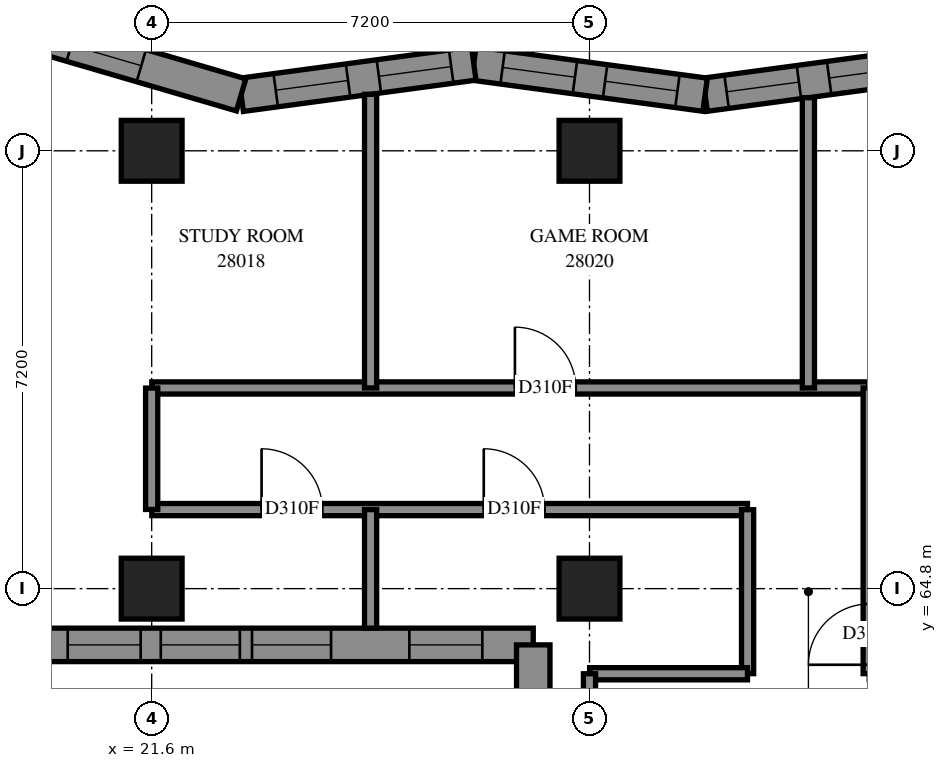
"""IFC4 building model, lengths in metres.
Left out: names, types, materials, properties, quantities, classifications, styles, units other than length and angle.
Written with IfcOpenShell. Run it as: python <this file> out.ifc"""

import sys

from ifc_helpers import new_model, si_unit, direction, frame, frame_2d, origin, origin_2d, place, context, subcontext, project, spatial, polyline, rectangle, outline, extrude, element, fill, save


model = new_model("IFC4")
c1 = context("Model", 3, precision=1e-05, world=origin(), true_north=direction((0.0, 1.0)))
c2 = subcontext(c1, "Body", "Model", "MODEL_VIEW")
j1 = project(units=[si_unit("LENGTHUNIT", "METRE"), si_unit("PLANEANGLEUNIT", "RADIAN")], contexts=[c1])
p1 = place(None, origin())
s1 = spatial("IfcSite", under=j1, at=p1, CompositionType="ELEMENT")
p2 = place(p1, origin())
s2 = spatial("IfcBuilding", under=s1, at=p2, CompositionType="ELEMENT")
p3 = place(p2, frame((0.0, 0.0, 105.0)))
s3 = spatial("IfcBuildingStorey", under=s2, at=p3, CompositionType="ELEMENT", Elevation=105.0)
for number, where, z_axis, x_axis in (
    (1, (21.6, 64.8, 0.0), (0.0, 0.0, 1.0), (1.0, 0.0, 0.0)),
    (2, (21.6, 72.0, 0.0), (0.0, 0.0, 1.0), (1.0, 0.0, 0.0)),
    (3, (28.8, 64.8, 0.0), (0.0, 0.0, 1.0), (1.0, 0.0, 0.0)),
    (4, (28.8, 72.0, 0.0), (0.0, 0.0, 1.0), (1.0, 0.0, 0.0)),
):
    element("IfcColumn", number, at=place(p3, frame(where, z_axis=z_axis, x_axis=x_axis)), inside=s3, PredefinedType="COLUMN", context=c2, shape_type="SweptSolid", body=[
        extrude(rectangle(XDim=1.0, YDim=1.0, at=origin_2d()), origin(), (0.0, 0.0, 1.0), 3.1),
    ])
p4 = place(p3, frame((34.505, 73.434, 0.0), z_axis=(0.0, 0.0, 1.0), x_axis=(-0.9910647018, -0.133381996, 0.0)))
e5 = element("IfcWall", 5, at=p4, inside=s3, PredefinedType="SOLIDWALL", context=c2, shape_type="SweptSolid", body=[
    extrude(outline(polyline([(-0.037, -0.275), (3.802, -0.275), (3.876, 0.275), (0.037, 0.275), (-0.037, -0.275)])), origin(), (0.0, 0.0, 1.0), 3.1),
])
p5 = place(p4, frame((0.581, 0.0, 0.5)))
e6 = element("IfcOpeningElement", 6, at=p5, cuts=e5, PredefinedType="OPENING", context=c2, shape_type="SweptSolid", body=[
    extrude(rectangle(XDim=1.2, YDim=2.45, at=frame_2d((0.6, 1.225))), frame((0.0, 0.285, 0.0), z_axis=(0.0, -1.0, 0.0), x_axis=(1.0, 0.0, 0.0)), (0.0, 0.0, 1.0), 0.57),
])
p6 = place(p4, frame((2.281, 0.0, 0.5)))
e7 = element("IfcOpeningElement", 7, at=p6, cuts=e5, PredefinedType="OPENING", context=c2, shape_type="SweptSolid", body=[
    extrude(rectangle(XDim=1.2, YDim=2.45, at=frame_2d((0.6, 1.225))), frame((0.0, 0.285, 0.0), z_axis=(0.0, -1.0, 0.0), x_axis=(1.0, 0.0, 0.0)), (0.0, 0.0, 1.0), 0.57),
])
p7 = place(p3, frame((30.701, 72.922, 0.0), z_axis=(0.0, 0.0, 1.0), x_axis=(-0.9910651652, 0.1333785524, 0.0)))
e8 = element("IfcWall", 8, at=p7, inside=s3, PredefinedType="SOLIDWALL", context=c2, shape_type="SweptSolid", body=[
    extrude(outline(polyline([(0.037, -0.275), (3.876, -0.275), (3.802, 0.275), (-0.037, 0.275), (0.037, -0.275)])), origin(), (0.0, 0.0, 1.0), 3.1),
])
p8 = place(p7, frame((0.459, 0.0, 0.5)))
e9 = element("IfcOpeningElement", 9, at=p8, cuts=e8, PredefinedType="OPENING", context=c2, shape_type="SweptSolid", body=[
    extrude(rectangle(XDim=1.2, YDim=2.45, at=frame_2d((0.6, 1.225))), frame((0.0, 0.285, 0.0), z_axis=(0.0, -1.0, 0.0), x_axis=(1.0, 0.0, 0.0)), (0.0, 0.0, 1.0), 0.57),
])
p9 = place(p7, frame((2.16, 0.0, 0.5)))
e10 = element("IfcOpeningElement", 10, at=p9, cuts=e8, PredefinedType="OPENING", context=c2, shape_type="SweptSolid", body=[
    extrude(rectangle(XDim=1.2, YDim=2.45, at=frame_2d((0.6, 1.225))), frame((0.0, 0.285, 0.0), z_axis=(0.0, -1.0, 0.0), x_axis=(1.0, 0.0, 0.0)), (0.0, 0.0, 1.0), 0.57),
])
p10 = place(p3, frame((26.897, 73.434, 0.0), z_axis=(0.0, 0.0, 1.0), x_axis=(-0.9910665233, -0.1333684607, 0.0)))
e11 = element("IfcWall", 11, at=p10, inside=s3, PredefinedType="SOLIDWALL", context=c2, shape_type="SweptSolid", body=[
    extrude(outline(polyline([(-0.037, -0.275), (3.802, -0.275), (3.918, 0.275), (0.037, 0.275), (-0.037, -0.275)])), origin(), (0.0, 0.0, 1.0), 3.1),
])
p11 = place(p10, frame((0.374, 0.0, 0.5)))
e12 = element("IfcOpeningElement", 12, at=p11, cuts=e11, PredefinedType="OPENING", context=c2, shape_type="SweptSolid", body=[
    extrude(rectangle(XDim=1.2, YDim=2.45, at=frame_2d((0.6, 1.225))), frame((0.0, 0.285, 0.0), z_axis=(0.0, -1.0, 0.0), x_axis=(1.0, 0.0, 0.0)), (0.0, 0.0, 1.0), 0.57),
])
p12 = place(p10, frame((2.086, 0.0, 0.5)))
e13 = element("IfcOpeningElement", 13, at=p12, cuts=e11, PredefinedType="OPENING", context=c2, shape_type="SweptSolid", body=[
    extrude(rectangle(XDim=1.2, YDim=2.45, at=frame_2d((0.6, 1.225))), frame((0.0, 0.285, 0.0), z_axis=(0.0, -1.0, 0.0), x_axis=(1.0, 0.0, 0.0)), (0.0, 0.0, 1.0), 0.57),
])
p13 = place(p3, frame((23.071, 72.92, 0.0), z_axis=(0.0, 0.0, 1.0), x_axis=(-0.9598398865, 0.280548378, 0.0)))
e14 = element("IfcWall", 14, at=p13, inside=s3, PredefinedType="SOLIDWALL", context=c2, shape_type="SweptSolid", body=[
    extrude(outline(polyline([(0.058, -0.275), (4.022, -0.275), (3.288, 0.275), (-0.058, 0.275), (0.058, -0.275)])), origin(), (0.0, 0.0, 1.0), 3.1),
])
p14 = place(p13, frame((1.71, 0.0, 0.5)))
e15 = element("IfcOpeningElement", 15, at=p14, cuts=e14, PredefinedType="OPENING", context=c2, shape_type="SweptSolid", body=[
    extrude(rectangle(XDim=1.2, YDim=2.45, at=frame_2d((0.6, 1.225))), frame((0.0, 0.285, 0.0), z_axis=(0.0, -1.0, 0.0), x_axis=(1.0, 0.0, 0.0)), (0.0, 0.0, 1.0), 0.57),
])
p15 = place(p3, frame((19.563, 63.875, 0.0), z_axis=(0.0, 0.0, 1.0), x_axis=(1.0, 0.0, 0.0)))
e16 = element("IfcWall", 16, at=p15, inside=s3, PredefinedType="SOLIDWALL", context=c2, shape_type="SweptSolid", body=[
    extrude(outline(polyline([(-0.275, -0.275), (8.037, -0.275), (8.587, 0.275), (0.275, 0.275), (-0.275, -0.275)])), origin(), (0.0, 0.0, 1.0), 3.1),
])
p16 = place(p15, frame((2.187, 0.0, 0.5)))
e17 = element("IfcOpeningElement", 17, at=p16, cuts=e16, PredefinedType="OPENING", context=c2, shape_type="SweptSolid", body=[
    extrude(rectangle(XDim=1.3, YDim=2.45, at=frame_2d((0.65, 1.225))), frame((0.0, 0.285, 0.0), z_axis=(0.0, -1.0, 0.0), x_axis=(1.0, 0.0, 0.0)), (0.0, 0.0, 1.0), 0.57),
])
p17 = place(p15, frame((3.687, 0.0, 0.5)))
e18 = element("IfcOpeningElement", 18, at=p17, cuts=e16, PredefinedType="OPENING", context=c2, shape_type="SweptSolid", body=[
    extrude(rectangle(XDim=1.3, YDim=2.45, at=frame_2d((0.65, 1.225))), frame((0.0, 0.285, 0.0), z_axis=(0.0, -1.0, 0.0), x_axis=(1.0, 0.0, 0.0)), (0.0, 0.0, 1.0), 0.57),
])
p18 = place(p15, frame((0.656, 0.0, 0.5)))
e19 = element("IfcOpeningElement", 19, at=p18, cuts=e16, PredefinedType="OPENING", context=c2, shape_type="SweptSolid", body=[
    extrude(rectangle(XDim=1.2, YDim=2.45, at=frame_2d((0.6, 1.225))), frame((0.0, 0.285, 0.0), z_axis=(0.0, -1.0, 0.0), x_axis=(1.0, 0.0, 0.0)), (0.0, 0.0, 1.0), 0.57),
])
p19 = place(p15, frame((6.274, 0.0, 0.5)))
e20 = element("IfcOpeningElement", 20, at=p19, cuts=e16, PredefinedType="OPENING", context=c2, shape_type="SweptSolid", body=[
    extrude(rectangle(XDim=1.2, YDim=2.45, at=frame_2d((0.6, 1.225))), frame((0.0, 0.285, 0.0), z_axis=(0.0, -1.0, 0.0), x_axis=(1.0, 0.0, 0.0)), (0.0, 0.0, 1.0), 0.57),
])
p20 = place(p3, frame((27.875, 63.875, 0.0), z_axis=(0.0, 0.0, 1.0), x_axis=(0.0, -1.0, 0.0)))
e21 = element("IfcWall", 21, at=p20, inside=s3, PredefinedType="SOLIDWALL", context=c2, shape_type="SweptSolid", body=[
    extrude(outline(polyline([(0.275, -0.275), (8.587, -0.275), (8.037, 0.275), (-0.275, 0.275), (0.275, -0.275)])), origin(), (0.0, 0.0, 1.0), 3.1),
])
p21 = place(p20, frame((3.325, 0.0, 0.5)))
e22 = element("IfcOpeningElement", 22, at=p21, cuts=e21, PredefinedType="OPENING", context=c2, shape_type="SweptSolid", body=[
    extrude(rectangle(XDim=1.3, YDim=2.45, at=frame_2d((0.65, 1.225))), frame((0.0, 0.285, 0.0), z_axis=(0.0, -1.0, 0.0), x_axis=(1.0, 0.0, 0.0)), (0.0, 0.0, 1.0), 0.57),
])
p22 = place(p20, frame((4.975, 0.0, 0.5)))
e23 = element("IfcOpeningElement", 23, at=p22, cuts=e21, PredefinedType="OPENING", context=c2, shape_type="SweptSolid", body=[
    extrude(rectangle(XDim=1.3, YDim=2.45, at=frame_2d((0.65, 1.225))), frame((0.0, 0.285, 0.0), z_axis=(0.0, -1.0, 0.0), x_axis=(1.0, 0.0, 0.0)), (0.0, 0.0, 1.0), 0.57),
])
p23 = place(p20, frame((0.838, 0.0, 0.5)))
e24 = element("IfcOpeningElement", 24, at=p23, cuts=e21, PredefinedType="OPENING", context=c2, shape_type="SweptSolid", body=[
    extrude(rectangle(XDim=1.2, YDim=2.45, at=frame_2d((0.6, 1.225))), frame((0.0, 0.285, 0.0), z_axis=(0.0, -1.0, 0.0), x_axis=(1.0, 0.0, 0.0)), (0.0, 0.0, 1.0), 0.57),
])
p24 = place(p20, frame((6.456, 0.0, 0.5)))
e25 = element("IfcOpeningElement", 25, at=p24, cuts=e21, PredefinedType="OPENING", context=c2, shape_type="SweptSolid", body=[
    extrude(rectangle(XDim=1.2, YDim=2.45, at=frame_2d((0.6, 1.225))), frame((0.0, 0.285, 0.0), z_axis=(0.0, -1.0, 0.0), x_axis=(1.0, 0.0, 0.0)), (0.0, 0.0, 1.0), 0.57),
])
p25 = place(p3, frame((21.602, 68.1, 0.0), z_axis=(0.0, 0.0, 1.0), x_axis=(1.0, 0.0, 0.0)))
e26 = element("IfcWall", 26, at=p25, inside=s3, PredefinedType="PARTITIONING", context=c2, shape_type="SweptSolid", body=[
    extrude(rectangle(XDim=11.798, YDim=0.2, at=frame_2d((5.899, 0.0))), origin(), (0.0, 0.0, 1.0), 3.1),
])
p26 = place(p25, frame((5.972, 0.0, 0.0)))
e27 = element("IfcOpeningElement", 27, at=p26, cuts=e26, PredefinedType="OPENING", context=c2, shape_type="SweptSolid", body=[
    extrude(rectangle(XDim=1.0, YDim=2.1, at=frame_2d((0.5, 1.05))), frame((0.0, 0.11, 0.0), z_axis=(0.0, -1.0, 0.0), x_axis=(1.0, 0.0, 0.0)), (0.0, 0.0, 1.0), 0.22),
])
p27 = place(p3, frame((21.602, 66.1, 0.0), z_axis=(0.0, 0.0, 1.0), x_axis=(1.0, 0.0, 0.0)))
e28 = element("IfcWall", 28, at=p27, inside=s3, PredefinedType="PARTITIONING", context=c2, shape_type="SweptSolid", body=[
    extrude(rectangle(XDim=9.796, YDim=0.2, at=frame_2d((4.898, 0.0))), origin(), (0.0, 0.0, 1.0), 3.1),
])
p28 = place(p27, frame((1.805, 0.0, 0.0)))
e29 = element("IfcOpeningElement", 29, at=p28, cuts=e28, PredefinedType="OPENING", context=c2, shape_type="SweptSolid", body=[
    extrude(rectangle(XDim=1.0, YDim=2.1, at=frame_2d((0.5, 1.05))), frame((0.0, 0.11, 0.0), z_axis=(0.0, -1.0, 0.0), x_axis=(1.0, 0.0, 0.0)), (0.0, 0.0, 1.0), 0.22),
])
p29 = place(p27, frame((5.459, 0.0, 0.0)))
e30 = element("IfcOpeningElement", 30, at=p29, cuts=e28, PredefinedType="OPENING", context=c2, shape_type="SweptSolid", body=[
    extrude(rectangle(XDim=1.0, YDim=2.1, at=frame_2d((0.5, 1.05))), frame((0.0, 0.11, 0.0), z_axis=(0.0, -1.0, 0.0), x_axis=(1.0, 0.0, 0.0)), (0.0, 0.0, 1.0), 0.22),
])
p30 = place(p3, frame((25.2, 68.1, 0.0), z_axis=(0.0, 0.0, 1.0), x_axis=(0.0, 1.0, 0.0)))
e31 = element("IfcWall", 31, at=p30, inside=s3, PredefinedType="PARTITIONING", context=c2, shape_type="SweptSolid", body=[
    extrude(rectangle(XDim=4.829, YDim=0.2, at=frame_2d((2.414, 0.0))), origin(), (0.0, 0.0, 1.0), 3.1),
])
p31 = place(p3, frame((32.4, 68.1, 0.0), z_axis=(0.0, 0.0, 1.0), x_axis=(0.0, 1.0, 0.0)))
e32 = element("IfcWall", 32, at=p31, inside=s3, PredefinedType="PARTITIONING", context=c2, shape_type="SweptSolid", body=[
    extrude(rectangle(XDim=4.774, YDim=0.2, at=frame_2d((2.387, 0.0))), origin(), (0.0, 0.0, 1.0), 3.1),
])
p32 = place(p3, frame((33.4, 63.402, 0.0), z_axis=(0.0, 0.0, 1.0), x_axis=(0.0, 1.0, 0.0)))
e33 = element("IfcWall", 33, at=p32, inside=s3, PredefinedType="PARTITIONING", context=c2, shape_type="SweptSolid", body=[
    extrude(rectangle(XDim=4.698, YDim=0.2, at=frame_2d((2.349, 0.0))), origin(), (0.0, 0.0, 1.0), 3.1),
])
p33 = place(p32, frame((0.146, 0.0, 0.0)))
e34 = element("IfcOpeningElement", 34, at=p33, cuts=e33, PredefinedType="OPENING", context=c2, shape_type="SweptSolid", body=[
    extrude(rectangle(XDim=1.0, YDim=2.1, at=frame_2d((0.5, 1.05))), frame((0.0, 0.11, 0.0), z_axis=(0.0, -1.0, 0.0), x_axis=(1.0, 0.0, 0.0)), (0.0, 0.0, 1.0), 0.22),
])
p34 = place(p3, frame((31.4, 63.402, 0.0), z_axis=(0.0, 0.0, 1.0), x_axis=(0.0, 1.0, 0.0)))
e35 = element("IfcWall", 35, at=p34, inside=s3, PredefinedType="PARTITIONING", context=c2, shape_type="SweptSolid", body=[
    extrude(rectangle(XDim=2.696, YDim=0.2, at=frame_2d((1.348, 0.0))), origin(), (0.0, 0.0, 1.0), 3.1),
])
p35 = place(p3, frame((28.802, 63.4, 0.0), z_axis=(0.0, 0.0, 1.0), x_axis=(1.0, 0.0, 0.0)))
e36 = element("IfcWall", 36, at=p35, inside=s3, PredefinedType="PARTITIONING", context=c2, shape_type="SweptSolid", body=[
    extrude(rectangle(XDim=2.596, YDim=0.2, at=frame_2d((1.298, 0.0))), origin(), (0.0, 0.0, 1.0), 3.1),
])
p36 = place(p3, frame((28.8, 61.4, 0.0), z_axis=(0.0, 0.0, 1.0), x_axis=(0.0, 1.0, 0.0)))
e37 = element("IfcWall", 37, at=p36, inside=s3, PredefinedType="PARTITIONING", context=c2, shape_type="SweptSolid", body=[
    extrude(rectangle(XDim=2.0, YDim=0.2, at=frame_2d((1.0, 0.0))), origin(), (0.0, 0.0, 1.0), 2.6),
])
p37 = place(p3, frame((21.6, 66.102, 0.0), z_axis=(0.0, 0.0, 1.0), x_axis=(0.0, 1.0, 0.0)))
e38 = element("IfcWall", 38, at=p37, inside=s3, PredefinedType="PARTITIONING", context=c2, shape_type="SweptSolid", body=[
    extrude(rectangle(XDim=1.996, YDim=0.2, at=frame_2d((0.998, 0.0))), origin(), (0.0, 0.0, 1.0), 2.6),
])
p38 = place(p3, frame((25.2, 64.15, 0.0), z_axis=(0.0, 0.0, 1.0), x_axis=(0.0, 1.0, 0.0)))
e39 = element("IfcWall", 39, at=p38, inside=s3, PredefinedType="PARTITIONING", context=c2, shape_type="SweptSolid", body=[
    extrude(rectangle(XDim=1.95, YDim=0.2, at=frame_2d((0.975, 0.0))), origin(), (0.0, 0.0, 1.0), 3.1),
])
p39 = place(p5, origin())
e40 = element("IfcWindow", 40, at=p39, inside=s3, PartitioningType="SINGLE_PANEL", PredefinedType="WINDOW", context=c2, shape_type="SweptSolid", body=[
    extrude(rectangle(XDim=1.2, YDim=2.45, at=frame_2d((0.6, 1.225))), frame((0.0, 0.155, 0.0), z_axis=(0.0, -1.0, 0.0), x_axis=(1.0, 0.0, 0.0)), (0.0, 0.0, 1.0), 0.06),
])
fill(e6, e40)
p40 = place(p6, origin())
e41 = element("IfcWindow", 41, at=p40, inside=s3, PartitioningType="SINGLE_PANEL", PredefinedType="WINDOW", context=c2, shape_type="SweptSolid", body=[
    extrude(rectangle(XDim=1.2, YDim=2.45, at=frame_2d((0.6, 1.225))), frame((0.0, 0.155, 0.0), z_axis=(0.0, -1.0, 0.0), x_axis=(1.0, 0.0, 0.0)), (0.0, 0.0, 1.0), 0.06),
])
fill(e7, e41)
p41 = place(p8, origin())
e42 = element("IfcWindow", 42, at=p41, inside=s3, PartitioningType="SINGLE_PANEL", PredefinedType="WINDOW", context=c2, shape_type="SweptSolid", body=[
    extrude(rectangle(XDim=1.2, YDim=2.45, at=frame_2d((0.6, 1.225))), frame((0.0, 0.155, 0.0), z_axis=(0.0, -1.0, 0.0), x_axis=(1.0, 0.0, 0.0)), (0.0, 0.0, 1.0), 0.06),
])
fill(e9, e42)
p42 = place(p9, origin())
e43 = element("IfcWindow", 43, at=p42, inside=s3, PartitioningType="SINGLE_PANEL", PredefinedType="WINDOW", context=c2, shape_type="SweptSolid", body=[
    extrude(rectangle(XDim=1.2, YDim=2.45, at=frame_2d((0.6, 1.225))), frame((0.0, 0.155, 0.0), z_axis=(0.0, -1.0, 0.0), x_axis=(1.0, 0.0, 0.0)), (0.0, 0.0, 1.0), 0.06),
])
fill(e10, e43)
p43 = place(p11, origin())
e44 = element("IfcWindow", 44, at=p43, inside=s3, PartitioningType="SINGLE_PANEL", PredefinedType="WINDOW", context=c2, shape_type="SweptSolid", body=[
    extrude(rectangle(XDim=1.2, YDim=2.45, at=frame_2d((0.6, 1.225))), frame((0.0, 0.155, 0.0), z_axis=(0.0, -1.0, 0.0), x_axis=(1.0, 0.0, 0.0)), (0.0, 0.0, 1.0), 0.06),
])
fill(e12, e44)
p44 = place(p12, origin())
e45 = element("IfcWindow", 45, at=p44, inside=s3, PartitioningType="SINGLE_PANEL", PredefinedType="WINDOW", context=c2, shape_type="SweptSolid", body=[
    extrude(rectangle(XDim=1.2, YDim=2.45, at=frame_2d((0.6, 1.225))), frame((0.0, 0.155, 0.0), z_axis=(0.0, -1.0, 0.0), x_axis=(1.0, 0.0, 0.0)), (0.0, 0.0, 1.0), 0.06),
])
fill(e13, e45)
p45 = place(p14, origin())
e46 = element("IfcWindow", 46, at=p45, inside=s3, PartitioningType="SINGLE_PANEL", PredefinedType="WINDOW", context=c2, shape_type="SweptSolid", body=[
    extrude(rectangle(XDim=1.2, YDim=2.45, at=frame_2d((0.6, 1.225))), frame((0.0, 0.155, 0.0), z_axis=(0.0, -1.0, 0.0), x_axis=(1.0, 0.0, 0.0)), (0.0, 0.0, 1.0), 0.06),
])
fill(e15, e46)
p46 = place(p16, origin())
e47 = element("IfcWindow", 47, at=p46, inside=s3, PartitioningType="SINGLE_PANEL", PredefinedType="WINDOW", context=c2, shape_type="SweptSolid", body=[
    extrude(rectangle(XDim=1.3, YDim=2.45, at=frame_2d((0.65, 1.225))), frame((0.0, 0.155, 0.0), z_axis=(0.0, -1.0, 0.0), x_axis=(1.0, 0.0, 0.0)), (0.0, 0.0, 1.0), 0.06),
])
fill(e17, e47)
p47 = place(p17, origin())
e48 = element("IfcWindow", 48, at=p47, inside=s3, PartitioningType="SINGLE_PANEL", PredefinedType="WINDOW", context=c2, shape_type="SweptSolid", body=[
    extrude(rectangle(XDim=1.3, YDim=2.45, at=frame_2d((0.65, 1.225))), frame((0.0, 0.155, 0.0), z_axis=(0.0, -1.0, 0.0), x_axis=(1.0, 0.0, 0.0)), (0.0, 0.0, 1.0), 0.06),
])
fill(e18, e48)
p48 = place(p18, origin())
e49 = element("IfcWindow", 49, at=p48, inside=s3, PartitioningType="SINGLE_PANEL", PredefinedType="WINDOW", context=c2, shape_type="SweptSolid", body=[
    extrude(rectangle(XDim=1.2, YDim=2.45, at=frame_2d((0.6, 1.225))), frame((0.0, 0.155, 0.0), z_axis=(0.0, -1.0, 0.0), x_axis=(1.0, 0.0, 0.0)), (0.0, 0.0, 1.0), 0.06),
])
fill(e19, e49)
p49 = place(p19, origin())
e50 = element("IfcWindow", 50, at=p49, inside=s3, PartitioningType="SINGLE_PANEL", PredefinedType="WINDOW", context=c2, shape_type="SweptSolid", body=[
    extrude(rectangle(XDim=1.2, YDim=2.45, at=frame_2d((0.6, 1.225))), frame((0.0, 0.155, 0.0), z_axis=(0.0, -1.0, 0.0), x_axis=(1.0, 0.0, 0.0)), (0.0, 0.0, 1.0), 0.06),
])
fill(e20, e50)
p50 = place(p28, origin())
e51 = element("IfcDoor", 51, at=p50, inside=s3, OperationType="SINGLE_SWING_RIGHT", PredefinedType="DOOR", context=c2, shape_type="SweptSolid", body=[
    extrude(rectangle(XDim=1.0, YDim=2.1, at=frame_2d((0.5, 1.05))), frame((0.0, 0.025, 0.0), z_axis=(0.0, -1.0, 0.0), x_axis=(1.0, 0.0, 0.0)), (0.0, 0.0, 1.0), 0.05),
])
fill(e29, e51)
p51 = place(p29, origin())
e52 = element("IfcDoor", 52, at=p51, inside=s3, OperationType="SINGLE_SWING_RIGHT", PredefinedType="DOOR", context=c2, shape_type="SweptSolid", body=[
    extrude(rectangle(XDim=1.0, YDim=2.1, at=frame_2d((0.5, 1.05))), frame((0.0, 0.025, 0.0), z_axis=(0.0, -1.0, 0.0), x_axis=(1.0, 0.0, 0.0)), (0.0, 0.0, 1.0), 0.05),
])
fill(e30, e52)
p52 = place(p26, origin())
e53 = element("IfcDoor", 53, at=p52, inside=s3, OperationType="SINGLE_SWING_LEFT", PredefinedType="DOOR", context=c2, shape_type="SweptSolid", body=[
    extrude(rectangle(XDim=1.0, YDim=2.1, at=frame_2d((0.5, 1.05))), frame((0.0, 0.025, 0.0), z_axis=(0.0, -1.0, 0.0), x_axis=(1.0, 0.0, 0.0)), (0.0, 0.0, 1.0), 0.05),
])
fill(e27, e53)
p53 = place(p33, origin())
e54 = element("IfcDoor", 54, at=p53, inside=s3, OperationType="SINGLE_SWING_LEFT", PredefinedType="DOOR", context=c2, shape_type="SweptSolid", body=[
    extrude(rectangle(XDim=1.0, YDim=2.1, at=frame_2d((0.5, 1.05))), frame((0.0, 0.025, 0.0), z_axis=(0.0, -1.0, 0.0), x_axis=(1.0, 0.0, 0.0)), (0.0, 0.0, 1.0), 0.05),
])
fill(e34, e54)
save(model, sys.argv[1])
